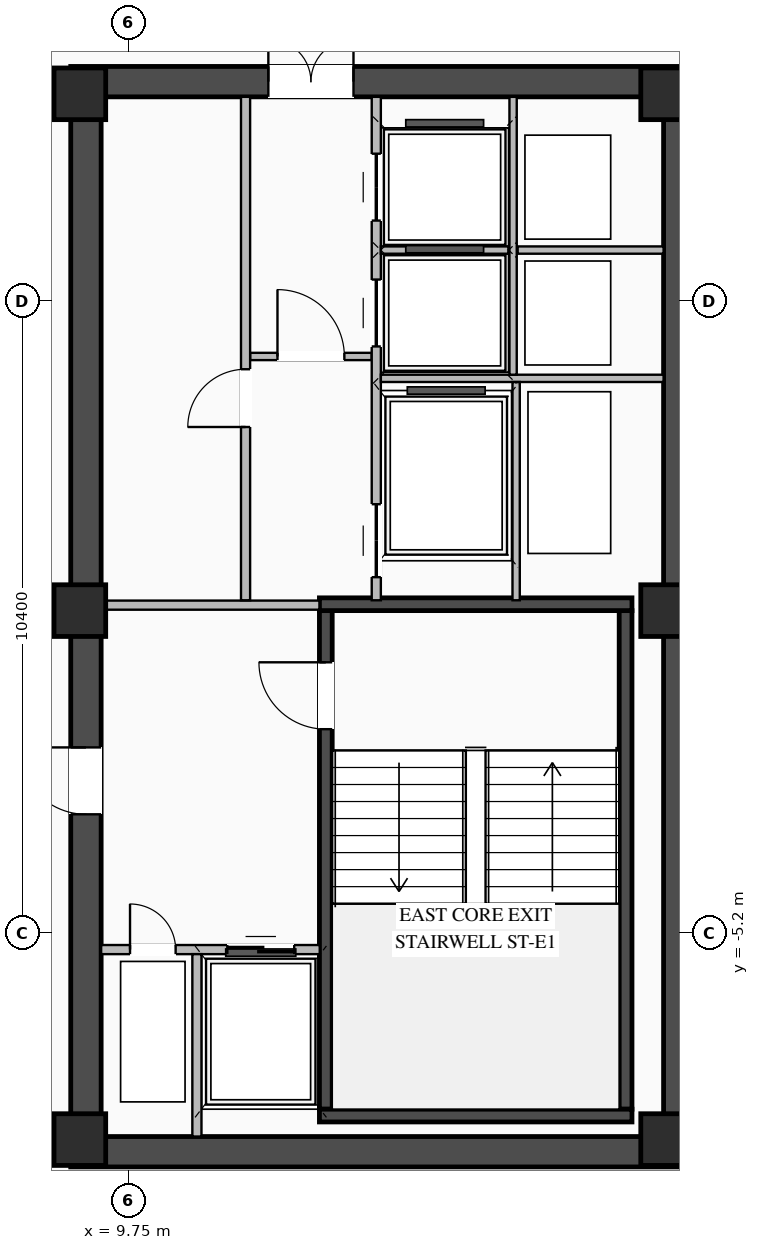
"""IFC4 building model, lengths in metres.
Left out: names, types, materials, properties, quantities, classifications, styles, units other than length and angle.
Written with IfcOpenShell. Run it as: python <this file> out.ifc"""

import sys

from ifc_helpers import new_model, si_unit, direction, frame, frame_2d, origin, origin_2d, place, context, subcontext, project, spatial, rectangle, extrude, element, fill, save


model = new_model("IFC4")
c1 = context("Model", 3, precision=1e-05, world=origin(), true_north=direction((0.0, 1.0)))
c2 = subcontext(c1, "Body", "Model", "MODEL_VIEW")
j1 = project(units=[si_unit("LENGTHUNIT", "METRE"), si_unit("PLANEANGLEUNIT", "RADIAN")], contexts=[c1])
p1 = place(None, origin())
s1 = spatial("IfcSite", under=j1, at=p1, CompositionType="ELEMENT")
p2 = place(p1, origin())
s2 = spatial("IfcBuilding", under=s1, at=p2, CompositionType="ELEMENT")
p3 = place(p2, frame((0.0, 0.0, 208.5)))
s3 = spatial("IfcBuildingStorey", under=s2, at=p3, CompositionType="ELEMENT", Elevation=208.5)
p4 = place(p3, frame((8.8, -8.8, 0.0), z_axis=(0.0, 0.0, 1.0), x_axis=(1.0, 0.0, 0.0)))
e1 = element("IfcWall", 1, at=p4, inside=s3, PredefinedType="SHEAR", context=c2, shape_type="SweptSolid", body=[
    extrude(rectangle(XDim=10.25, YDim=0.5, at=frame_2d((5.125, 0.0))), origin(), (0.0, 0.0, 1.0), 3.27),
])
p5 = place(p3, frame((8.8, 8.8, 0.0), z_axis=(0.0, 0.0, 1.0), x_axis=(1.0, 0.0, 0.0)))
e2 = element("IfcWall", 2, at=p5, inside=s3, PredefinedType="SHEAR", context=c2, shape_type="SweptSolid", body=[
    extrude(rectangle(XDim=10.25, YDim=0.5, at=frame_2d((5.125, 0.0))), origin(), (0.0, 0.0, 1.0), 3.27),
])
p6 = place(p5, frame((3.25, 0.0, 0.0)))
e3 = element("IfcOpeningElement", 3, at=p6, cuts=e2, PredefinedType="OPENING", context=c2, shape_type="SweptSolid", body=[
    extrude(rectangle(XDim=1.4, YDim=2.05, at=frame_2d((0.7, 1.025))), frame((0.0, 0.26, 0.0), z_axis=(0.0, -1.0, 0.0), x_axis=(1.0, 0.0, 0.0)), (0.0, 0.0, 1.0), 0.52),
])
p7 = place(p3, frame((9.05, -8.55, 0.0), z_axis=(0.0, 0.0, 1.0), x_axis=(0.0, 1.0, 0.0)))
e4 = element("IfcWall", 4, at=p7, inside=s3, PredefinedType="SHEAR", context=c2, shape_type="SweptSolid", body=[
    extrude(rectangle(XDim=17.1, YDim=0.5, at=frame_2d((8.55, 0.0))), origin(), (0.0, 0.0, 1.0), 3.27),
])
p8 = place(p7, frame((5.3, 0.0, 0.0)))
e5 = element("IfcOpeningElement", 5, at=p8, cuts=e4, PredefinedType="OPENING", context=c2, shape_type="SweptSolid", body=[
    extrude(rectangle(XDim=1.1, YDim=2.08, at=frame_2d((0.55, 1.04))), frame((0.0, 0.26, 0.0), z_axis=(0.0, -1.0, 0.0), x_axis=(1.0, 0.0, 0.0)), (0.0, 0.0, 1.0), 0.52),
])
p9 = place(p3, frame((18.8, -8.55, 0.0), z_axis=(0.0, 0.0, 1.0), x_axis=(0.0, 1.0, 0.0)))
e6 = element("IfcWall", 6, at=p9, inside=s3, PredefinedType="SHEAR", context=c2, shape_type="SweptSolid", body=[
    extrude(rectangle(XDim=17.1, YDim=0.5, at=frame_2d((8.55, 0.0))), origin(), (0.0, 0.0, 1.0), 3.27),
])
p10 = place(p3, frame((12.995, -8.1, 0.0), z_axis=(0.0, 0.0, 1.0), x_axis=(0.0, 1.0, 0.0)))
e7 = element("IfcWall", 7, at=p10, inside=s3, PredefinedType="SHEAR", context=c2, shape_type="SweptSolid", body=[
    extrude(rectangle(XDim=8.2, YDim=0.21, at=frame_2d((4.1, 0.0))), origin(), (0.0, 0.0, 1.0), 3.27),
])
p11 = place(p10, frame((6.25, 0.0, 0.0)))
e8 = element("IfcOpeningElement", 8, at=p11, cuts=e7, PredefinedType="OPENING", context=c2, shape_type="SweptSolid", body=[
    extrude(rectangle(XDim=1.1, YDim=2.15, at=frame_2d((0.55, 1.075))), frame((0.0, 0.115, 0.0), z_axis=(0.0, -1.0, 0.0), x_axis=(1.0, 0.0, 0.0)), (0.0, 0.0, 1.0), 0.23),
])
p12 = place(p3, frame((17.925, -8.1, 0.0), z_axis=(0.0, 0.0, 1.0), x_axis=(0.0, 1.0, 0.0)))
e9 = element("IfcWall", 9, at=p12, inside=s3, PredefinedType="SHEAR", context=c2, shape_type="SweptSolid", body=[
    extrude(rectangle(XDim=8.2, YDim=0.21, at=frame_2d((4.1, 0.0))), origin(), (0.0, 0.0, 1.0), 3.27),
])
for number, where, z_axis, x_axis in (
    (10, (12.89, -8.205, 0.0), (0.0, 0.0, 1.0), (1.0, 0.0, 0.0)),
    (11, (18.03, 0.205, 0.0), (0.0, 0.0, 1.0), (-1.0, 0.0, 0.0)),
):
    element("IfcWall", number, at=place(p3, frame(where, z_axis=z_axis, x_axis=x_axis)), inside=s3, PredefinedType="SHEAR", context=c2, shape_type="SweptSolid", body=[
        extrude(rectangle(XDim=5.14, YDim=0.21, at=frame_2d((2.57, 0.0))), origin(), (0.0, 0.0, 1.0), 3.27),
    ])
for number, where, z_axis, x_axis in (
    (12, (8.95, -8.6, 0.0), (0.0, 0.0, 1.0), (1.0, 0.0, 0.0)),
    (13, (8.95, 0.1, 0.0), (0.0, 0.0, 1.0), (1.0, 0.0, 0.0)),
    (14, (8.95, 8.6, 0.0), (0.0, 0.0, 1.0), (1.0, 0.0, 0.0)),
    (15, (18.6, -8.6, 0.0), (0.0, 0.0, 1.0), (1.0, 0.0, 0.0)),
    (16, (18.6, 0.1, 0.0), (0.0, 0.0, 1.0), (1.0, 0.0, 0.0)),
    (17, (18.6, 8.6, 0.0), (0.0, 0.0, 1.0), (1.0, 0.0, 0.0)),
):
    element("IfcColumn", number, at=place(p3, frame(where, z_axis=z_axis, x_axis=x_axis)), inside=s3, PredefinedType="COLUMN", context=c2, shape_type="SweptSolid", body=[
        extrude(rectangle(XDim=0.85, YDim=0.85, at=origin_2d()), origin(), (0.0, 0.0, 1.0), 3.45),
    ])
p13 = place(p3, frame((9.3, -5.475, 0.0), z_axis=(0.0, 0.0, 1.0), x_axis=(1.0, 0.0, 0.0)))
e18 = element("IfcWall", 18, at=p13, inside=s3, PredefinedType="STANDARD", context=c2, shape_type="SweptSolid", body=[
    extrude(rectangle(XDim=3.595, YDim=0.15, at=frame_2d((1.797, 0.0))), origin(), (0.0, 0.0, 1.0), 3.25),
])
p14 = place(p13, frame((2.075, 0.0, 0.0)))
e19 = element("IfcOpeningElement", 19, at=p14, cuts=e18, PredefinedType="OPENING", context=c2, shape_type="SweptSolid", body=[
    extrude(rectangle(XDim=1.1, YDim=2.15, at=frame_2d((0.55, 1.075))), frame((0.0, 0.085, 0.0), z_axis=(0.0, -1.0, 0.0), x_axis=(1.0, 0.0, 0.0)), (0.0, 0.0, 1.0), 0.17),
])
p15 = place(p13, frame((0.475, 0.0, 0.0)))
e20 = element("IfcOpeningElement", 20, at=p15, cuts=e18, PredefinedType="OPENING", context=c2, shape_type="SweptSolid", body=[
    extrude(rectangle(XDim=0.75, YDim=2.05, at=frame_2d((0.375, 1.025))), frame((0.0, 0.085, 0.0), z_axis=(0.0, -1.0, 0.0), x_axis=(1.0, 0.0, 0.0)), (0.0, 0.0, 1.0), 0.17),
])
p16 = place(p3, frame((10.875, -8.55, 0.0), z_axis=(0.0, 0.0, 1.0), x_axis=(0.0, 1.0, 0.0)))
e21 = element("IfcWall", 21, at=p16, inside=s3, PredefinedType="STANDARD", context=c2, shape_type="SweptSolid", body=[
    extrude(rectangle(XDim=3.0, YDim=0.15, at=frame_2d((1.5, 0.0))), origin(), (0.0, 0.0, 1.0), 3.25),
])
p17 = place(p3, frame((9.3, 0.19, 0.0), z_axis=(0.0, 0.0, 1.0), x_axis=(1.0, 0.0, 0.0)))
e22 = element("IfcWall", 22, at=p17, inside=s3, PredefinedType="STANDARD", context=c2, shape_type="SweptSolid", body=[
    extrude(rectangle(XDim=3.59, YDim=0.15, at=frame_2d((1.795, 0.0))), origin(), (0.0, 0.0, 1.0), 2.645),
])
p18 = place(p3, frame((11.75, 4.28, 0.0), z_axis=(0.0, 0.0, 1.0), x_axis=(1.0, 0.0, 0.0)))
e23 = element("IfcWall", 23, at=p18, inside=s3, PredefinedType="STANDARD", context=c2, shape_type="SweptSolid", body=[
    extrude(rectangle(XDim=2.0, YDim=0.12, at=frame_2d((1.0, 0.0))), origin(), (0.0, 0.0, 1.0), 3.25),
])
p19 = place(p18, frame((0.45, 0.0, 0.0)))
e24 = element("IfcOpeningElement", 24, at=p19, cuts=e23, PredefinedType="OPENING", context=c2, shape_type="SweptSolid", body=[
    extrude(rectangle(XDim=1.1, YDim=2.1, at=frame_2d((0.55, 1.05))), frame((0.0, 0.07, 0.0), z_axis=(0.0, -1.0, 0.0), x_axis=(1.0, 0.0, 0.0)), (0.0, 0.0, 1.0), 0.14),
])
p20 = place(p3, frame((11.675, 0.27, 0.0), z_axis=(0.0, 0.0, 1.0), x_axis=(0.0, 1.0, 0.0)))
e25 = element("IfcWall", 25, at=p20, inside=s3, PredefinedType="STANDARD", context=c2, shape_type="SweptSolid", body=[
    extrude(rectangle(XDim=8.28, YDim=0.15, at=frame_2d((4.14, 0.0))), origin(), (0.0, 0.0, 1.0), 3.25),
])
p21 = place(p20, frame((2.85, 0.0, 0.0)))
e26 = element("IfcOpeningElement", 26, at=p21, cuts=e25, PredefinedType="OPENING", context=c2, shape_type="SweptSolid", body=[
    extrude(rectangle(XDim=0.95, YDim=2.05, at=frame_2d((0.475, 1.025))), frame((0.0, 0.085, 0.0), z_axis=(0.0, -1.0, 0.0), x_axis=(1.0, 0.0, 0.0)), (0.0, 0.0, 1.0), 0.17),
])
p22 = place(p3, frame((13.825, 0.27, 0.0), z_axis=(0.0, 0.0, 1.0), x_axis=(0.0, 1.0, 0.0)))
e27 = element("IfcWall", 27, at=p22, inside=s3, PredefinedType="STANDARD", context=c2, shape_type="SweptSolid", body=[
    extrude(rectangle(XDim=8.28, YDim=0.15, at=frame_2d((4.14, 0.0))), origin(), (0.0, 0.0, 1.0), 3.25),
])
p23 = place(p22, frame((4.175, 0.0, 0.0)))
e28 = element("IfcOpeningElement", 28, at=p23, cuts=e27, PredefinedType="OPENING", context=c2, shape_type="SweptSolid", body=[
    extrude(rectangle(XDim=1.1, YDim=2.1, at=frame_2d((0.55, 1.05))), frame((0.0, 0.085, 0.0), z_axis=(0.0, -1.0, 0.0), x_axis=(1.0, 0.0, 0.0)), (0.0, 0.0, 1.0), 0.17),
])
p24 = place(p22, frame((6.245, 0.0, 0.0)))
e29 = element("IfcOpeningElement", 29, at=p24, cuts=e27, PredefinedType="OPENING", context=c2, shape_type="SweptSolid", body=[
    extrude(rectangle(XDim=1.1, YDim=2.1, at=frame_2d((0.55, 1.05))), frame((0.0, 0.085, 0.0), z_axis=(0.0, -1.0, 0.0), x_axis=(1.0, 0.0, 0.0)), (0.0, 0.0, 1.0), 0.17),
])
p25 = place(p22, frame((0.38, 0.0, 0.0)))
e30 = element("IfcOpeningElement", 30, at=p25, cuts=e27, PredefinedType="OPENING", context=c2, shape_type="SweptSolid", body=[
    extrude(rectangle(XDim=1.2, YDim=2.1, at=frame_2d((0.6, 1.05))), frame((0.0, 0.085, 0.0), z_axis=(0.0, -1.0, 0.0), x_axis=(1.0, 0.0, 0.0)), (0.0, 0.0, 1.0), 0.17),
])
p26 = place(p3, frame((13.9, 3.92, 0.0), z_axis=(0.0, 0.0, 1.0), x_axis=(1.0, 0.0, 0.0)))
e31 = element("IfcWall", 31, at=p26, inside=s3, PredefinedType="STANDARD", context=c2, shape_type="SweptSolid", body=[
    extrude(rectangle(XDim=4.65, YDim=0.12, at=frame_2d((2.325, 0.0))), origin(), (0.0, 0.0, 1.0), 3.25),
])
p27 = place(p3, frame((16.15, 6.03, 0.0), z_axis=(0.0, 0.0, 1.0), x_axis=(1.0, 0.0, 0.0)))
e32 = element("IfcWall", 32, at=p27, inside=s3, PredefinedType="STANDARD", context=c2, shape_type="SweptSolid", body=[
    extrude(rectangle(XDim=2.4, YDim=0.12, at=frame_2d((1.2, 0.0))), origin(), (0.0, 0.0, 1.0), 3.25),
])
p28 = place(p3, frame((16.075, 3.98, 0.0), z_axis=(0.0, 0.0, 1.0), x_axis=(0.0, 1.0, 0.0)))
e33 = element("IfcWall", 33, at=p28, inside=s3, PredefinedType="STANDARD", context=c2, shape_type="SweptSolid", body=[
    extrude(rectangle(XDim=4.57, YDim=0.12, at=frame_2d((2.285, 0.0))), origin(), (0.0, 0.0, 1.0), 3.25),
])
p29 = place(p3, frame((13.9, 6.03, 0.0), z_axis=(0.0, 0.0, 1.0), x_axis=(1.0, 0.0, 0.0)))
e34 = element("IfcWall", 34, at=p29, inside=s3, PredefinedType="STANDARD", context=c2, shape_type="SweptSolid", body=[
    extrude(rectangle(XDim=2.1, YDim=0.12, at=frame_2d((1.05, 0.0))), origin(), (0.0, 0.0, 1.0), 3.25),
])
p30 = place(p3, frame((16.125, 0.27, 0.0), z_axis=(0.0, 0.0, 1.0), x_axis=(0.0, 1.0, 0.0)))
e35 = element("IfcWall", 35, at=p30, inside=s3, PredefinedType="STANDARD", context=c2, shape_type="SweptSolid", body=[
    extrude(rectangle(XDim=3.59, YDim=0.12, at=frame_2d((1.795, 0.0))), origin(), (0.0, 0.0, 1.0), 3.25),
])
p31 = place(p11, origin())
e36 = element("IfcDoor", 36, at=p31, inside=s3, OperationType="SINGLE_SWING_RIGHT", PredefinedType="DOOR", context=c2, shape_type="SweptSolid", body=[
    extrude(rectangle(XDim=1.1, YDim=2.15, at=frame_2d((0.55, 1.075))), frame((0.0, 0.025, 0.0), z_axis=(0.0, -1.0, 0.0), x_axis=(1.0, 0.0, 0.0)), (0.0, 0.0, 1.0), 0.05),
])
fill(e8, e36)
p32 = place(p14, origin())
e37 = element("IfcDoor", 37, at=p32, inside=s3, OperationType="DOUBLE_DOOR_SLIDING", PredefinedType="DOOR", context=c2, shape_type="SweptSolid", body=[
    extrude(rectangle(XDim=1.1, YDim=2.15, at=frame_2d((0.55, 1.075))), frame((0.0, 0.025, 0.0), z_axis=(0.0, -1.0, 0.0), x_axis=(1.0, 0.0, 0.0)), (0.0, 0.0, 1.0), 0.05),
])
fill(e19, e37)
p33 = place(p15, origin())
e38 = element("IfcDoor", 38, at=p33, inside=s3, OperationType="SINGLE_SWING_LEFT", PredefinedType="DOOR", context=c2, shape_type="SweptSolid", body=[
    extrude(rectangle(XDim=0.75, YDim=2.05, at=frame_2d((0.375, 1.025))), frame((0.0, 0.025, 0.0), z_axis=(0.0, -1.0, 0.0), x_axis=(1.0, 0.0, 0.0)), (0.0, 0.0, 1.0), 0.05),
])
fill(e20, e38)
p34 = place(p8, origin())
e39 = element("IfcDoor", 39, at=p34, inside=s3, OperationType="SINGLE_SWING_RIGHT", PredefinedType="DOOR", context=c2, shape_type="SweptSolid", body=[
    extrude(rectangle(XDim=1.1, YDim=2.08, at=frame_2d((0.55, 1.04))), frame((0.0, -0.155, 0.0), z_axis=(0.0, -1.0, 0.0), x_axis=(1.0, 0.0, 0.0)), (0.0, 0.0, 1.0), 0.05),
])
fill(e5, e39)
p35 = place(p19, origin())
e40 = element("IfcDoor", 40, at=p35, inside=s3, OperationType="SINGLE_SWING_LEFT", PredefinedType="DOOR", context=c2, shape_type="SweptSolid", body=[
    extrude(rectangle(XDim=1.1, YDim=2.1, at=frame_2d((0.55, 1.05))), frame((0.0, 0.025, 0.0), z_axis=(0.0, -1.0, 0.0), x_axis=(1.0, 0.0, 0.0)), (0.0, 0.0, 1.0), 0.05),
])
fill(e24, e40)
p36 = place(p6, origin())
e41 = element("IfcDoor", 41, at=p36, inside=s3, OperationType="DOUBLE_DOOR_SINGLE_SWING", PredefinedType="DOOR", context=c2, shape_type="SweptSolid", body=[
    extrude(rectangle(XDim=1.4, YDim=2.05, at=frame_2d((0.7, 1.025))), frame((0.0, 0.195, 0.0), z_axis=(0.0, -1.0, 0.0), x_axis=(1.0, 0.0, 0.0)), (0.0, 0.0, 1.0), 0.05),
])
fill(e3, e41)
p37 = place(p21, origin())
e42 = element("IfcDoor", 42, at=p37, inside=s3, OperationType="SINGLE_SWING_LEFT", PredefinedType="DOOR", context=c2, shape_type="SweptSolid", body=[
    extrude(rectangle(XDim=0.95, YDim=2.05, at=frame_2d((0.475, 1.025))), frame((0.0, 0.025, 0.0), z_axis=(0.0, -1.0, 0.0), x_axis=(1.0, 0.0, 0.0)), (0.0, 0.0, 1.0), 0.05),
])
fill(e26, e42)
p38 = place(p23, origin())
e43 = element("IfcDoor", 43, at=p38, inside=s3, OperationType="DOUBLE_DOOR_SLIDING", PredefinedType="DOOR", context=c2, shape_type="SweptSolid", body=[
    extrude(rectangle(XDim=1.1, YDim=2.1, at=frame_2d((0.55, 1.05))), frame((0.0, 0.025, 0.0), z_axis=(0.0, -1.0, 0.0), x_axis=(1.0, 0.0, 0.0)), (0.0, 0.0, 1.0), 0.05),
])
fill(e28, e43)
p39 = place(p24, origin())
e44 = element("IfcDoor", 44, at=p39, inside=s3, OperationType="DOUBLE_DOOR_SLIDING", PredefinedType="DOOR", context=c2, shape_type="SweptSolid", body=[
    extrude(rectangle(XDim=1.1, YDim=2.1, at=frame_2d((0.55, 1.05))), frame((0.0, 0.025, 0.0), z_axis=(0.0, -1.0, 0.0), x_axis=(1.0, 0.0, 0.0)), (0.0, 0.0, 1.0), 0.05),
])
fill(e29, e44)
p40 = place(p25, origin())
e45 = element("IfcDoor", 45, at=p40, inside=s3, OperationType="DOUBLE_DOOR_SLIDING", PredefinedType="DOOR", context=c2, shape_type="SweptSolid", body=[
    extrude(rectangle(XDim=1.2, YDim=2.1, at=frame_2d((0.6, 1.05))), frame((0.0, 0.025, 0.0), z_axis=(0.0, -1.0, 0.0), x_axis=(1.0, 0.0, 0.0)), (0.0, 0.0, 1.0), 0.05),
])
fill(e30, e45)
save(model, sys.argv[1])
